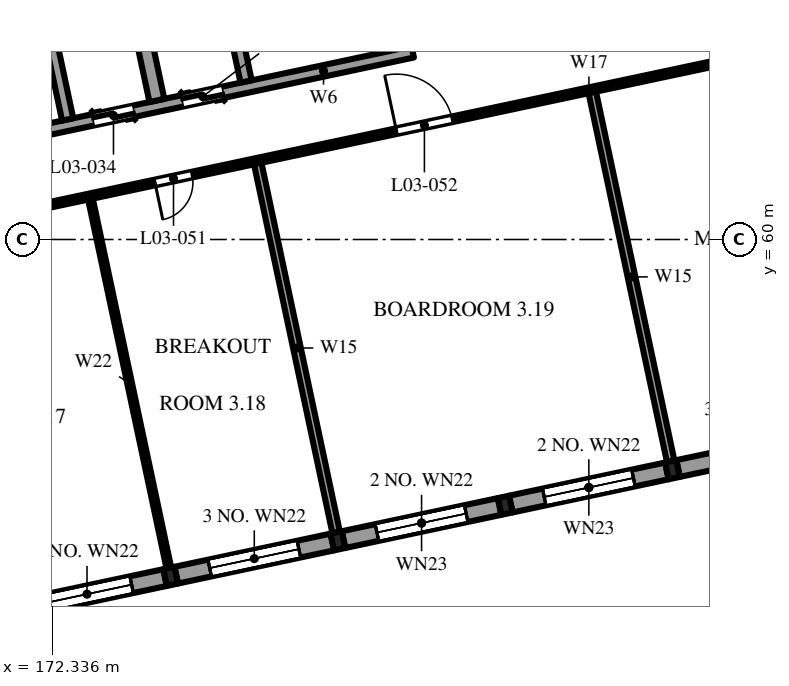
"""IFC4 building model, lengths in metres.
Left out: names, types, materials, properties, quantities, classifications, styles, units other than length and angle.
Written with IfcOpenShell. Run it as: python <this file> out.ifc"""

import sys

from ifc_helpers import new_model, si_unit, direction, frame, frame_2d, origin, origin_2d, place, context, subcontext, project, spatial, polyline, rectangle, i_section, outline, extrude, element, fill, save


model = new_model("IFC4")
c1 = context("Model", 3, precision=1e-05, world=origin(), true_north=direction((0.0, 1.0)))
c2 = subcontext(c1, "Body", "Model", "MODEL_VIEW")
j1 = project(units=[si_unit("LENGTHUNIT", "METRE"), si_unit("PLANEANGLEUNIT", "RADIAN")], contexts=[c1])
p1 = place(None, origin())
s1 = spatial("IfcSite", under=j1, at=p1, CompositionType="ELEMENT")
p2 = place(p1, origin())
s2 = spatial("IfcBuilding", under=s1, at=p2, CompositionType="ELEMENT")
p3 = place(p2, frame((0.0, 0.0, 16.8)))
s3 = spatial("IfcBuildingStorey", under=s2, at=p3, CompositionType="ELEMENT", Elevation=16.8)
for number, where, z_axis, x_axis in (
    (1, (175.454, 51.135, 0.0), (0.0, 0.0, 1.0), (0.978, 0.208, 0.0)),
    (2, (179.856, 52.071, 0.0), (0.0, 0.0, 1.0), (0.978, 0.208, 0.0)),
    (3, (184.258, 53.006, 0.0), (0.0, 0.0, 1.0), (0.978, 0.208, 0.0)),
    (4, (188.659, 53.942, 0.0), (0.0, 0.0, 1.0), (0.978, 0.208, 0.0)),
):
    element("IfcColumn", number, at=place(p3, frame(where, z_axis=z_axis, x_axis=x_axis)), inside=s3, PredefinedType="COLUMN", context=c2, shape_type="SweptSolid", body=[
        extrude(i_section(OverallWidth=0.3, OverallDepth=0.45, WebThickness=0.014, FlangeThickness=0.026, FilletRadius=0.027, at=origin_2d()), origin(), (0.0, 0.0, 1.0), 4.8),
    ])
p4 = place(p3, frame((168.423, 62.087, 0.0), z_axis=(0.0, 0.0, 1.0), x_axis=(0.978147662755, 0.20791139903, 0.0)))
e5 = element("IfcWall", 5, at=p4, inside=s3, PredefinedType="SHEAR", context=c2, shape_type="SweptSolid", body=[
    extrude(outline(polyline([(0.0, 0.0), (13.7, 0.0), (13.7, 12.929), (0.0, 12.196), (0.0, 0.0)])), frame((0.0, 0.15, 0.0), z_axis=(0.0, -1.0, 0.0), x_axis=(1.0, 0.0, 0.0)), (0.0, 0.0, 1.0), 0.3),
])
p5 = place(p4, frame((5.1, 0.0, 0.0)))
e6 = element("IfcOpeningElement", 6, at=p5, cuts=e5, PredefinedType="OPENING", context=c2, shape_type="SweptSolid", body=[
    extrude(rectangle(XDim=1.1, YDim=2.1, at=frame_2d((0.55, 1.05))), frame((0.0, 0.16, 0.0), z_axis=(0.0, -1.0, 0.0), x_axis=(1.0, 0.0, 0.0)), (0.0, 0.0, 1.0), 0.32),
])
p6 = place(p4, frame((7.5, 0.0, 0.0)))
e7 = element("IfcOpeningElement", 7, at=p6, cuts=e5, PredefinedType="OPENING", context=c2, shape_type="SweptSolid", body=[
    extrude(rectangle(XDim=1.1, YDim=2.1, at=frame_2d((0.55, 1.05))), frame((0.0, 0.16, 0.0), z_axis=(0.0, -1.0, 0.0), x_axis=(1.0, 0.0, 0.0)), (0.0, 0.0, 1.0), 0.32),
])
p7 = place(p3, frame((171.082, 70.985, 0.0), z_axis=(0.0, 0.0, 1.0), x_axis=(0.207915693476, -0.978146749934, 0.0)))
e8 = element("IfcWall", 8, at=p7, inside=s3, PredefinedType="SHEAR", context=c2, shape_type="SweptSolid", body=[
    extrude(outline(polyline([(0.0, 0.0), (8.0, 0.0), (8.0, 12.426), (0.0, 12.007), (0.0, 0.0)])), frame((0.0, 0.15, 0.0), z_axis=(0.0, -1.0, 0.0), x_axis=(1.0, 0.0, 0.0)), (0.0, 0.0, 1.0), 0.3),
])
p8 = place(p3, frame((175.777, 71.983, 0.0), z_axis=(0.0, 0.0, 1.0), x_axis=(0.207915693476, -0.978146749934, 0.0)))
e9 = element("IfcWall", 9, at=p8, inside=s3, PredefinedType="SHEAR", context=c2, shape_type="SweptSolid", body=[
    extrude(outline(polyline([(0.0, 0.0), (8.0, 0.0), (8.0, 12.683), (0.0, 12.264), (0.0, 0.0)])), frame((0.0, 0.15, 0.0), z_axis=(0.0, -1.0, 0.0), x_axis=(1.0, 0.0, 0.0)), (0.0, 0.0, 1.0), 0.3),
])
p9 = place(p3, frame((174.469, 66.593, 0.0), z_axis=(0.0, 0.0, 1.0), x_axis=(0.207933702079, -0.978142921837, 0.0)))
e10 = element("IfcWall", 10, at=p9, inside=s3, PredefinedType="SHEAR", context=c2, shape_type="SweptSolid", body=[
    extrude(outline(polyline([(0.0, 0.0), (3.0, 0.0), (3.0, 12.554), (0.0, 12.397), (0.0, 0.0)])), frame((0.0, 0.2, 0.0), z_axis=(0.0, -1.0, 0.0), x_axis=(1.0, 0.0, 0.0)), (0.0, 0.0, 1.0), 0.4),
])
p10 = place(p3, frame((171.199, 50.23, 0.0), z_axis=(0.0, 0.0, 1.0), x_axis=(0.978146440129, 0.207917150959, 0.0)))
e11 = element("IfcWall", 11, at=p10, inside=s3, PredefinedType="SOLIDWALL", context=c2, shape_type="SweptSolid", body=[
    extrude(outline(polyline([(0.0, 0.0), (4.2, 0.0), (4.2, 14.372), (0.0, 14.147), (0.0, 0.0)])), frame((0.0, 0.225, 0.0), z_axis=(0.0, -1.0, 0.0), x_axis=(1.0, 0.0, 0.0)), (0.0, 0.0, 1.0), 0.45),
])
p11 = place(p10, frame((0.9, 0.0, 0.9)))
e12 = element("IfcOpeningElement", 12, at=p11, cuts=e11, PredefinedType="OPENING", context=c2, shape_type="SweptSolid", body=[
    extrude(rectangle(XDim=2.4, YDim=2.4, at=frame_2d((1.2, 1.2))), frame((0.0, 0.235, 0.0), z_axis=(0.0, -1.0, 0.0), x_axis=(1.0, 0.0, 0.0)), (0.0, 0.0, 1.0), 0.47),
])
p12 = place(p10, frame((0.9, 0.0, 5.1)))
e13 = element("IfcOpeningElement", 13, at=p12, cuts=e11, PredefinedType="OPENING", context=c2, shape_type="SweptSolid", body=[
    extrude(rectangle(XDim=2.4, YDim=2.4, at=frame_2d((1.2, 1.2))), frame((0.0, 0.235, 0.0), z_axis=(0.0, -1.0, 0.0), x_axis=(1.0, 0.0, 0.0)), (0.0, 0.0, 1.0), 0.47),
])
p13 = place(p10, frame((0.9, 0.0, 9.3)))
e14 = element("IfcOpeningElement", 14, at=p13, cuts=e11, PredefinedType="OPENING", context=c2, shape_type="SweptSolid", body=[
    extrude(rectangle(XDim=2.4, YDim=2.4, at=frame_2d((1.2, 1.2))), frame((0.0, 0.235, 0.0), z_axis=(0.0, -1.0, 0.0), x_axis=(1.0, 0.0, 0.0)), (0.0, 0.0, 1.0), 0.47),
])
p14 = place(p3, frame((175.601, 51.166, 0.0), z_axis=(0.0, 0.0, 1.0), x_axis=(0.978143927149, 0.207928972925, 0.0)))
e15 = element("IfcWall", 15, at=p14, inside=s3, PredefinedType="SOLIDWALL", context=c2, shape_type="SweptSolid", body=[
    extrude(outline(polyline([(0.0, 0.0), (4.2, 0.0), (4.2, 14.613), (0.0, 14.388), (0.0, 0.0)])), frame((0.0, 0.225, 0.0), z_axis=(0.0, -1.0, 0.0), x_axis=(1.0, 0.0, 0.0)), (0.0, 0.0, 1.0), 0.45),
])
p15 = place(p14, frame((0.9, 0.0, 0.9)))
e16 = element("IfcOpeningElement", 16, at=p15, cuts=e15, PredefinedType="OPENING", context=c2, shape_type="SweptSolid", body=[
    extrude(rectangle(XDim=2.4, YDim=2.4, at=frame_2d((1.2, 1.2))), frame((0.0, 0.235, 0.0), z_axis=(0.0, -1.0, 0.0), x_axis=(1.0, 0.0, 0.0)), (0.0, 0.0, 1.0), 0.47),
])
p16 = place(p14, frame((0.9, 0.0, 5.1)))
e17 = element("IfcOpeningElement", 17, at=p16, cuts=e15, PredefinedType="OPENING", context=c2, shape_type="SweptSolid", body=[
    extrude(rectangle(XDim=2.4, YDim=2.4, at=frame_2d((1.2, 1.2))), frame((0.0, 0.235, 0.0), z_axis=(0.0, -1.0, 0.0), x_axis=(1.0, 0.0, 0.0)), (0.0, 0.0, 1.0), 0.47),
])
p17 = place(p14, frame((0.9, 0.0, 9.3)))
e18 = element("IfcOpeningElement", 18, at=p17, cuts=e15, PredefinedType="OPENING", context=c2, shape_type="SweptSolid", body=[
    extrude(rectangle(XDim=2.4, YDim=2.4, at=frame_2d((1.2, 1.2))), frame((0.0, 0.235, 0.0), z_axis=(0.0, -1.0, 0.0), x_axis=(1.0, 0.0, 0.0)), (0.0, 0.0, 1.0), 0.47),
])
p18 = place(p3, frame((180.003, 52.102, 0.0), z_axis=(0.0, 0.0, 1.0), x_axis=(0.978155748334, 0.207873355681, 0.0)))
e19 = element("IfcWall", 19, at=p18, inside=s3, PredefinedType="SOLIDWALL", context=c2, shape_type="SweptSolid", body=[
    extrude(outline(polyline([(0.0, 0.0), (4.2, 0.0), (4.2, 14.854), (0.0, 14.629), (0.0, 0.0)])), frame((0.0, 0.225, 0.0), z_axis=(0.0, -1.0, 0.0), x_axis=(1.0, 0.0, 0.0)), (0.0, 0.0, 1.0), 0.45),
])
p19 = place(p18, frame((0.9, 0.0, 0.6)))
e20 = element("IfcOpeningElement", 20, at=p19, cuts=e19, PredefinedType="OPENING", context=c2, shape_type="SweptSolid", body=[
    extrude(rectangle(XDim=2.4, YDim=2.7, at=frame_2d((1.2, 1.35))), frame((0.0, 0.235, 0.0), z_axis=(0.0, -1.0, 0.0), x_axis=(1.0, 0.0, 0.0)), (0.0, 0.0, 1.0), 0.47),
])
p20 = place(p18, frame((0.9, 0.0, 5.1)))
e21 = element("IfcOpeningElement", 21, at=p20, cuts=e19, PredefinedType="OPENING", context=c2, shape_type="SweptSolid", body=[
    extrude(rectangle(XDim=2.4, YDim=2.4, at=frame_2d((1.2, 1.2))), frame((0.0, 0.235, 0.0), z_axis=(0.0, -1.0, 0.0), x_axis=(1.0, 0.0, 0.0)), (0.0, 0.0, 1.0), 0.47),
])
p21 = place(p18, frame((0.9, 0.0, 9.3)))
e22 = element("IfcOpeningElement", 22, at=p21, cuts=e19, PredefinedType="OPENING", context=c2, shape_type="SweptSolid", body=[
    extrude(rectangle(XDim=2.4, YDim=2.4, at=frame_2d((1.2, 1.2))), frame((0.0, 0.235, 0.0), z_axis=(0.0, -1.0, 0.0), x_axis=(1.0, 0.0, 0.0)), (0.0, 0.0, 1.0), 0.47),
])
p22 = place(p3, frame((184.404, 53.037, 0.0), z_axis=(0.0, 0.0, 1.0), x_axis=(0.978143927149, 0.207928972925, 0.0)))
e23 = element("IfcWall", 23, at=p22, inside=s3, PredefinedType="SOLIDWALL", context=c2, shape_type="SweptSolid", body=[
    extrude(outline(polyline([(0.0, 0.0), (4.2, 0.0), (4.2, 15.094), (0.0, 14.87), (0.0, 0.0)])), frame((0.0, 0.225, 0.0), z_axis=(0.0, -1.0, 0.0), x_axis=(1.0, 0.0, 0.0)), (0.0, 0.0, 1.0), 0.45),
])
p23 = place(p22, frame((0.9, 0.0, 0.6)))
e24 = element("IfcOpeningElement", 24, at=p23, cuts=e23, PredefinedType="OPENING", context=c2, shape_type="SweptSolid", body=[
    extrude(rectangle(XDim=2.4, YDim=2.7, at=frame_2d((1.2, 1.35))), frame((0.0, 0.235, 0.0), z_axis=(0.0, -1.0, 0.0), x_axis=(1.0, 0.0, 0.0)), (0.0, 0.0, 1.0), 0.47),
])
p24 = place(p22, frame((0.9, 0.0, 5.1)))
e25 = element("IfcOpeningElement", 25, at=p24, cuts=e23, PredefinedType="OPENING", context=c2, shape_type="SweptSolid", body=[
    extrude(rectangle(XDim=2.4, YDim=2.4, at=frame_2d((1.2, 1.2))), frame((0.0, 0.235, 0.0), z_axis=(0.0, -1.0, 0.0), x_axis=(1.0, 0.0, 0.0)), (0.0, 0.0, 1.0), 0.47),
])
p25 = place(p22, frame((0.9, 0.0, 9.3)))
e26 = element("IfcOpeningElement", 26, at=p25, cuts=e23, PredefinedType="OPENING", context=c2, shape_type="SweptSolid", body=[
    extrude(rectangle(XDim=2.4, YDim=2.4, at=frame_2d((1.2, 1.2))), frame((0.0, 0.235, 0.0), z_axis=(0.0, -1.0, 0.0), x_axis=(1.0, 0.0, 0.0)), (0.0, 0.0, 1.0), 0.47),
])
p26 = place(p3, frame((188.806, 53.973, 0.0), z_axis=(0.0, 0.0, 1.0), x_axis=(0.978146440129, 0.207917150959, 0.0)))
e27 = element("IfcWall", 27, at=p26, inside=s3, PredefinedType="SOLIDWALL", context=c2, shape_type="SweptSolid", body=[
    extrude(outline(polyline([(0.0, 0.0), (4.2, 0.0), (4.2, 15.335), (0.0, 15.11), (0.0, 0.0)])), frame((0.0, 0.225, 0.0), z_axis=(0.0, -1.0, 0.0), x_axis=(1.0, 0.0, 0.0)), (0.0, 0.0, 1.0), 0.45),
])
p27 = place(p26, frame((0.9, 0.0, 0.9)))
e28 = element("IfcOpeningElement", 28, at=p27, cuts=e27, PredefinedType="OPENING", context=c2, shape_type="SweptSolid", body=[
    extrude(rectangle(XDim=2.4, YDim=2.4, at=frame_2d((1.2, 1.2))), frame((0.0, 0.235, 0.0), z_axis=(0.0, -1.0, 0.0), x_axis=(1.0, 0.0, 0.0)), (0.0, 0.0, 1.0), 0.47),
])
p28 = place(p26, frame((0.9, 0.0, 5.1)))
e29 = element("IfcOpeningElement", 29, at=p28, cuts=e27, PredefinedType="OPENING", context=c2, shape_type="SweptSolid", body=[
    extrude(rectangle(XDim=2.4, YDim=2.4, at=frame_2d((1.2, 1.2))), frame((0.0, 0.235, 0.0), z_axis=(0.0, -1.0, 0.0), x_axis=(1.0, 0.0, 0.0)), (0.0, 0.0, 1.0), 0.47),
])
p29 = place(p26, frame((0.9, 0.0, 9.3)))
e30 = element("IfcOpeningElement", 30, at=p29, cuts=e27, PredefinedType="OPENING", context=c2, shape_type="SweptSolid", body=[
    extrude(rectangle(XDim=2.4, YDim=2.4, at=frame_2d((1.2, 1.2))), frame((0.0, 0.235, 0.0), z_axis=(0.0, -1.0, 0.0), x_axis=(1.0, 0.0, 0.0)), (0.0, 0.0, 1.0), 0.47),
])
p30 = place(p3, frame((151.32, 56.458, 0.0), z_axis=(0.0, 0.0, 1.0), x_axis=(0.97814787394, 0.207910405482, 0.0)))
e31 = element("IfcWall", 31, at=p30, inside=s3, PredefinedType="PARTITIONING", context=c2, shape_type="SweptSolid", body=[
    extrude(outline(polyline([(0.0, 0.0), (45.0, 0.0), (45.0, 12.948), (0.0, 10.54), (0.0, 0.0)])), frame((0.0, 0.075, 0.0), z_axis=(0.0, -1.0, 0.0), x_axis=(1.0, 0.0, 0.0)), (0.0, 0.0, 1.0), 0.15),
])
p31 = place(p30, frame((3.6, 0.0, 0.0)))
e32 = element("IfcOpeningElement", 32, at=p31, cuts=e31, PredefinedType="OPENING", context=c2, shape_type="SweptSolid", body=[
    extrude(rectangle(XDim=1.8, YDim=2.1, at=frame_2d((0.9, 1.05))), frame((0.0, 0.085, 0.0), z_axis=(0.0, -1.0, 0.0), x_axis=(1.0, 0.0, 0.0)), (0.0, 0.0, 1.0), 0.17),
])
p32 = place(p30, frame((10.75, 0.0, 0.0)))
e33 = element("IfcOpeningElement", 33, at=p32, cuts=e31, PredefinedType="OPENING", context=c2, shape_type="SweptSolid", body=[
    extrude(rectangle(XDim=1.0, YDim=2.1, at=frame_2d((0.5, 1.05))), frame((0.0, 0.085, 0.0), z_axis=(0.0, -1.0, 0.0), x_axis=(1.0, 0.0, 0.0)), (0.0, 0.0, 1.0), 0.17),
])
p33 = place(p30, frame((17.1, 0.0, 0.0)))
e34 = element("IfcOpeningElement", 34, at=p33, cuts=e31, PredefinedType="OPENING", context=c2, shape_type="SweptSolid", body=[
    extrude(rectangle(XDim=1.8, YDim=2.1, at=frame_2d((0.9, 1.05))), frame((0.0, 0.085, 0.0), z_axis=(0.0, -1.0, 0.0), x_axis=(1.0, 0.0, 0.0)), (0.0, 0.0, 1.0), 0.17),
])
p34 = place(p30, frame((24.25, 0.0, 0.0)))
e35 = element("IfcOpeningElement", 35, at=p34, cuts=e31, PredefinedType="OPENING", context=c2, shape_type="SweptSolid", body=[
    extrude(rectangle(XDim=1.0, YDim=2.1, at=frame_2d((0.5, 1.05))), frame((0.0, 0.085, 0.0), z_axis=(0.0, -1.0, 0.0), x_axis=(1.0, 0.0, 0.0)), (0.0, 0.0, 1.0), 0.17),
])
p35 = place(p30, frame((30.75, 0.0, 0.0)))
e36 = element("IfcOpeningElement", 36, at=p35, cuts=e31, PredefinedType="OPENING", context=c2, shape_type="SweptSolid", body=[
    extrude(rectangle(XDim=1.5, YDim=2.1, at=frame_2d((0.75, 1.05))), frame((0.0, 0.085, 0.0), z_axis=(0.0, -1.0, 0.0), x_axis=(1.0, 0.0, 0.0)), (0.0, 0.0, 1.0), 0.17),
])
p36 = place(p30, frame((39.6, 0.0, 0.0)))
e37 = element("IfcOpeningElement", 37, at=p36, cuts=e31, PredefinedType="OPENING", context=c2, shape_type="SweptSolid", body=[
    extrude(rectangle(XDim=1.8, YDim=2.1, at=frame_2d((0.9, 1.05))), frame((0.0, 0.085, 0.0), z_axis=(0.0, -1.0, 0.0), x_axis=(1.0, 0.0, 0.0)), (0.0, 0.0, 1.0), 0.17),
])
p37 = place(p3, frame((175.407, 51.355, 0.0), z_axis=(0.0, 0.0, 1.0), x_axis=(-0.20790935802, 0.978148096582, 0.0)))
e38 = element("IfcWall", 38, at=p37, inside=s3, PredefinedType="PARTITIONING", context=c2, shape_type="SweptSolid", body=[
    extrude(outline(polyline([(0.0, 0.0), (9.925, 0.0), (9.925, 11.748), (0.0, 11.949), (0.0, 0.0)])), frame((0.0, 0.062, 0.0), z_axis=(0.0, -1.0, 0.0), x_axis=(1.0, 0.0, 0.0)), (0.0, 0.0, 1.0), 0.125),
])
p38 = place(p3, frame((179.809, 52.291, 0.0), z_axis=(0.0, 0.0, 1.0), x_axis=(-0.207904355568, 0.978149159861, 0.0)))
e39 = element("IfcWall", 39, at=p38, inside=s3, PredefinedType="PARTITIONING", context=c2, shape_type="SweptSolid", body=[
    extrude(outline(polyline([(0.0, 0.0), (9.925, 0.0), (9.925, 11.989), (0.0, 12.19), (0.0, 0.0)])), frame((0.0, 0.1, 0.0), z_axis=(0.0, -1.0, 0.0), x_axis=(1.0, 0.0, 0.0)), (0.0, 0.0, 1.0), 0.2),
])
p39 = place(p3, frame((188.613, 54.162, 0.0), z_axis=(0.0, 0.0, 1.0), x_axis=(-0.207932893358, 0.978143093754, 0.0)))
e40 = element("IfcWall", 40, at=p39, inside=s3, PredefinedType="PARTITIONING", context=c2, shape_type="SweptSolid", body=[
    extrude(outline(polyline([(0.0, 0.0), (9.925, 0.0), (9.925, 11.751), (0.0, 11.751), (0.0, 0.0)])), frame((0.0, 0.1, 0.0), z_axis=(0.0, -1.0, 0.0), x_axis=(1.0, 0.0, 0.0)), (0.0, 0.0, 1.0), 0.2),
])
p40 = place(p11, origin())
e41 = element("IfcWindow", 41, at=p40, inside=s3, PartitioningType="SINGLE_PANEL", PredefinedType="WINDOW", context=c2, shape_type="SweptSolid", body=[
    extrude(rectangle(XDim=2.4, YDim=2.4, at=frame_2d((1.2, 1.2))), frame((0.0, 0.03, 0.0), z_axis=(0.0, -1.0, 0.0), x_axis=(1.0, 0.0, 0.0)), (0.0, 0.0, 1.0), 0.06),
])
fill(e12, e41)
p41 = place(p12, origin())
e42 = element("IfcWindow", 42, at=p41, inside=s3, PartitioningType="SINGLE_PANEL", PredefinedType="WINDOW", context=c2, shape_type="SweptSolid", body=[
    extrude(rectangle(XDim=2.4, YDim=2.4, at=frame_2d((1.2, 1.2))), frame((0.0, 0.03, 0.0), z_axis=(0.0, -1.0, 0.0), x_axis=(1.0, 0.0, 0.0)), (0.0, 0.0, 1.0), 0.06),
])
fill(e13, e42)
p42 = place(p13, origin())
e43 = element("IfcWindow", 43, at=p42, inside=s3, PartitioningType="SINGLE_PANEL", PredefinedType="WINDOW", context=c2, shape_type="SweptSolid", body=[
    extrude(rectangle(XDim=2.4, YDim=2.4, at=frame_2d((1.2, 1.2))), frame((0.0, 0.03, 0.0), z_axis=(0.0, -1.0, 0.0), x_axis=(1.0, 0.0, 0.0)), (0.0, 0.0, 1.0), 0.06),
])
fill(e14, e43)
p43 = place(p15, origin())
e44 = element("IfcWindow", 44, at=p43, inside=s3, PartitioningType="SINGLE_PANEL", PredefinedType="WINDOW", context=c2, shape_type="SweptSolid", body=[
    extrude(rectangle(XDim=2.4, YDim=2.4, at=frame_2d((1.2, 1.2))), frame((0.0, 0.03, 0.0), z_axis=(0.0, -1.0, 0.0), x_axis=(1.0, 0.0, 0.0)), (0.0, 0.0, 1.0), 0.06),
])
fill(e16, e44)
p44 = place(p16, origin())
e45 = element("IfcWindow", 45, at=p44, inside=s3, PartitioningType="SINGLE_PANEL", PredefinedType="WINDOW", context=c2, shape_type="SweptSolid", body=[
    extrude(rectangle(XDim=2.4, YDim=2.4, at=frame_2d((1.2, 1.2))), frame((0.0, 0.03, 0.0), z_axis=(0.0, -1.0, 0.0), x_axis=(1.0, 0.0, 0.0)), (0.0, 0.0, 1.0), 0.06),
])
fill(e17, e45)
p45 = place(p17, origin())
e46 = element("IfcWindow", 46, at=p45, inside=s3, PartitioningType="SINGLE_PANEL", PredefinedType="WINDOW", context=c2, shape_type="SweptSolid", body=[
    extrude(rectangle(XDim=2.4, YDim=2.4, at=frame_2d((1.2, 1.2))), frame((0.0, 0.03, 0.0), z_axis=(0.0, -1.0, 0.0), x_axis=(1.0, 0.0, 0.0)), (0.0, 0.0, 1.0), 0.06),
])
fill(e18, e46)
p46 = place(p19, origin())
e47 = element("IfcWindow", 47, at=p46, inside=s3, PartitioningType="SINGLE_PANEL", PredefinedType="WINDOW", context=c2, shape_type="SweptSolid", body=[
    extrude(rectangle(XDim=2.4, YDim=2.7, at=frame_2d((1.2, 1.35))), frame((0.0, 0.03, 0.0), z_axis=(0.0, -1.0, 0.0), x_axis=(1.0, 0.0, 0.0)), (0.0, 0.0, 1.0), 0.06),
])
fill(e20, e47)
p47 = place(p20, origin())
e48 = element("IfcWindow", 48, at=p47, inside=s3, PartitioningType="SINGLE_PANEL", PredefinedType="WINDOW", context=c2, shape_type="SweptSolid", body=[
    extrude(rectangle(XDim=2.4, YDim=2.4, at=frame_2d((1.2, 1.2))), frame((0.0, 0.03, 0.0), z_axis=(0.0, -1.0, 0.0), x_axis=(1.0, 0.0, 0.0)), (0.0, 0.0, 1.0), 0.06),
])
fill(e21, e48)
p48 = place(p21, origin())
e49 = element("IfcWindow", 49, at=p48, inside=s3, PartitioningType="SINGLE_PANEL", PredefinedType="WINDOW", context=c2, shape_type="SweptSolid", body=[
    extrude(rectangle(XDim=2.4, YDim=2.4, at=frame_2d((1.2, 1.2))), frame((0.0, 0.03, 0.0), z_axis=(0.0, -1.0, 0.0), x_axis=(1.0, 0.0, 0.0)), (0.0, 0.0, 1.0), 0.06),
])
fill(e22, e49)
p49 = place(p23, origin())
e50 = element("IfcWindow", 50, at=p49, inside=s3, PartitioningType="SINGLE_PANEL", PredefinedType="WINDOW", context=c2, shape_type="SweptSolid", body=[
    extrude(rectangle(XDim=2.4, YDim=2.7, at=frame_2d((1.2, 1.35))), frame((0.0, 0.03, 0.0), z_axis=(0.0, -1.0, 0.0), x_axis=(1.0, 0.0, 0.0)), (0.0, 0.0, 1.0), 0.06),
])
fill(e24, e50)
p50 = place(p24, origin())
e51 = element("IfcWindow", 51, at=p50, inside=s3, PartitioningType="SINGLE_PANEL", PredefinedType="WINDOW", context=c2, shape_type="SweptSolid", body=[
    extrude(rectangle(XDim=2.4, YDim=2.4, at=frame_2d((1.2, 1.2))), frame((0.0, 0.03, 0.0), z_axis=(0.0, -1.0, 0.0), x_axis=(1.0, 0.0, 0.0)), (0.0, 0.0, 1.0), 0.06),
])
fill(e25, e51)
p51 = place(p25, origin())
e52 = element("IfcWindow", 52, at=p51, inside=s3, PartitioningType="SINGLE_PANEL", PredefinedType="WINDOW", context=c2, shape_type="SweptSolid", body=[
    extrude(rectangle(XDim=2.4, YDim=2.4, at=frame_2d((1.2, 1.2))), frame((0.0, 0.03, 0.0), z_axis=(0.0, -1.0, 0.0), x_axis=(1.0, 0.0, 0.0)), (0.0, 0.0, 1.0), 0.06),
])
fill(e26, e52)
p52 = place(p5, frame((1.1, 0.0, 0.0), z_axis=(0.0, 0.0, 1.0), x_axis=(-1.0, 0.0, 0.0)))
e53 = element("IfcDoor", 53, at=p52, inside=s3, OperationType="DOUBLE_DOOR_SLIDING", PredefinedType="DOOR", context=c2, shape_type="SweptSolid", body=[
    extrude(rectangle(XDim=1.1, YDim=2.1, at=frame_2d((0.55, 1.05))), frame((0.0, 0.025, 0.0), z_axis=(0.0, -1.0, 0.0), x_axis=(1.0, 0.0, 0.0)), (0.0, 0.0, 1.0), 0.05),
])
fill(e6, e53)
p53 = place(p6, frame((1.1, 0.0, 0.0), z_axis=(0.0, 0.0, 1.0), x_axis=(-1.0, 0.0, 0.0)))
e54 = element("IfcDoor", 54, at=p53, inside=s3, OperationType="DOUBLE_DOOR_SLIDING", PredefinedType="DOOR", context=c2, shape_type="SweptSolid", body=[
    extrude(rectangle(XDim=1.1, YDim=2.1, at=frame_2d((0.55, 1.05))), frame((0.0, 0.025, 0.0), z_axis=(0.0, -1.0, 0.0), x_axis=(1.0, 0.0, 0.0)), (0.0, 0.0, 1.0), 0.05),
])
fill(e7, e54)
p54 = place(p34, frame((1.0, 0.0, 0.0), z_axis=(0.0, 0.0, 1.0), x_axis=(-1.0, 0.0, 0.0)))
e55 = element("IfcDoor", 55, at=p54, inside=s3, OperationType="SINGLE_SWING_LEFT", PredefinedType="DOOR", context=c2, shape_type="SweptSolid", body=[
    extrude(rectangle(XDim=1.0, YDim=2.1, at=frame_2d((0.5, 1.05))), frame((0.0, 0.025, 0.0), z_axis=(0.0, -1.0, 0.0), x_axis=(1.0, 0.0, 0.0)), (0.0, 0.0, 1.0), 0.05),
])
fill(e35, e55)
p55 = place(p35, origin())
e56 = element("IfcDoor", 56, at=p55, inside=s3, OperationType="DOUBLE_DOOR_SINGLE_SWING", PredefinedType="DOOR", context=c2, shape_type="SweptSolid", body=[
    extrude(rectangle(XDim=1.5, YDim=2.1, at=frame_2d((0.75, 1.05))), frame((0.0, 0.025, 0.0), z_axis=(0.0, -1.0, 0.0), x_axis=(1.0, 0.0, 0.0)), (0.0, 0.0, 1.0), 0.05),
])
fill(e36, e56)
save(model, sys.argv[1])
